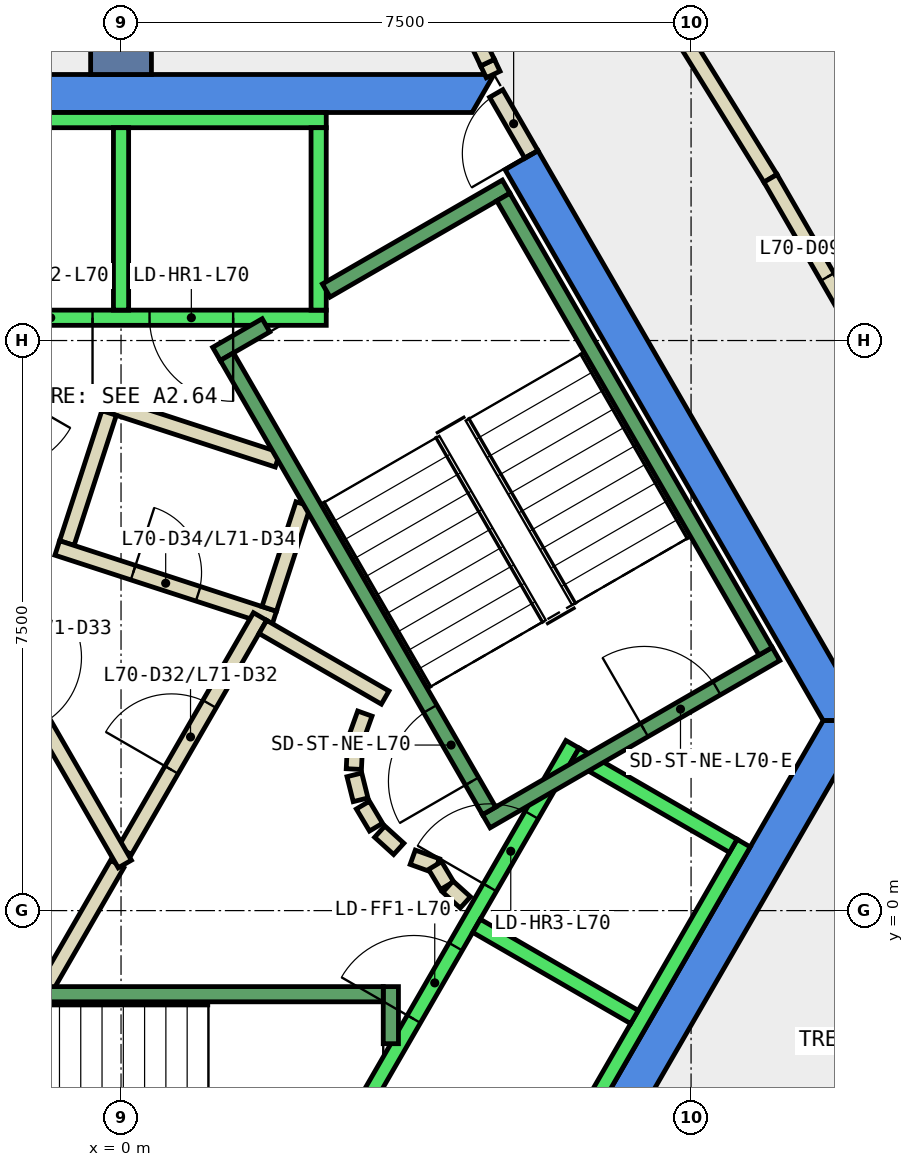
"""IFC4 building model, lengths in metres.
Left out: names, types, materials, properties, quantities, classifications, styles, units other than length and angle.
Written with IfcOpenShell. Run it as: python <this file> out.ifc"""

import sys

from ifc_helpers import new_model, si_unit, direction, frame, frame_2d, origin, place, context, subcontext, project, spatial, polyline, rectangle, outline, extrude, element, fill, save


model = new_model("IFC4")
c1 = context("Model", 3, precision=1e-05, world=origin(), true_north=direction((0.0, 1.0)))
c2 = subcontext(c1, "Body", "Model", "MODEL_VIEW")
j1 = project(units=[si_unit("LENGTHUNIT", "METRE"), si_unit("PLANEANGLEUNIT", "RADIAN")], contexts=[c1])
p1 = place(None, origin())
s1 = spatial("IfcSite", under=j1, at=p1, CompositionType="ELEMENT")
p2 = place(p1, origin())
s2 = spatial("IfcBuilding", under=s1, at=p2, CompositionType="ELEMENT")
p3 = place(p2, frame((0.0, 0.0, 300.8)))
s3 = spatial("IfcBuildingStorey", under=s2, at=p3, CompositionType="ELEMENT", Elevation=300.8)
p4 = place(p3, frame((0.0, 0.0, -0.34)))
e1 = element("IfcWall", 1, at=p4, inside=s3, PredefinedType="SHEAR", context=c2, shape_type="SweptSolid", body=[
    extrude(outline(polyline([(5.486, 9.998), (5.053, 9.748), (9.238, 2.5), (9.815, 2.5), (5.486, 9.998)])), origin(), (0.0, 0.0, 1.0), 3.6),
])
p5 = place(p3, frame((0.0, 0.0, -0.34)))
e2 = element("IfcWall", 2, at=p5, inside=s3, PredefinedType="SHEAR", context=c2, shape_type="SweptSolid", body=[
    extrude(outline(polyline([(4.907, 11.0), (-4.907, 11.0), (-4.619, 10.5), (4.619, 10.5), (4.907, 11.0)])), origin(), (0.0, 0.0, 1.0), 3.6),
])
p6 = place(p3, frame((0.0, 0.0, -0.34)))
e3 = element("IfcWall", 3, at=p6, inside=s3, PredefinedType="SHEAR", context=c2, shape_type="SweptSolid", body=[
    extrude(outline(polyline([(4.907, -6.0), (9.815, 2.5), (9.238, 2.5), (4.619, -5.5), (4.907, -6.0)])), origin(), (0.0, 0.0, 1.0), 3.6),
])
p7 = place(p3, frame((0.0, 11.0, -0.34), z_axis=(0.0, 0.0, 1.0), x_axis=(0.0, 1.0, 0.0)))
e4 = element("IfcWall", 4, at=p7, inside=s3, PredefinedType="SHEAR", context=c2, shape_type="SweptSolid", body=[
    extrude(rectangle(XDim=9.0, YDim=0.8, at=frame_2d((4.5, 0.0))), origin(), (0.0, 0.0, 1.0), 3.6),
])
p8 = place(p3, frame((2.06, 5.931, 0.0), z_axis=(0.0, 0.0, 1.0), x_axis=(-0.95092855133, 0.309410552932, 0.0)))
e5 = element("IfcWall", 5, at=p8, inside=s3, PredefinedType="PARTITIONING", context=c2, shape_type="SweptSolid", body=[
    extrude(rectangle(XDim=2.399, YDim=0.2, at=frame_2d((1.199, 0.0))), origin(), (0.0, 0.0, 1.0), 3.26),
])
p9 = place(p3, frame((-0.157, 6.547, 0.0), z_axis=(0.0, 0.0, 1.0), x_axis=(-0.308813127339, -0.951122732555, 0.0)))
e6 = element("IfcWall", 6, at=p9, inside=s3, PredefinedType="PARTITIONING", context=c2, shape_type="SweptSolid", body=[
    extrude(rectangle(XDim=1.8, YDim=0.2, at=frame_2d((0.9, 0.0))), origin(), (0.0, 0.0, 1.0), 3.26),
])
p10 = place(p3, frame((-0.839, 4.771, 0.0), z_axis=(0.0, 0.0, 1.0), x_axis=(0.950961084355, -0.309310549515, 0.0)))
e7 = element("IfcWall", 7, at=p10, inside=s3, PredefinedType="PARTITIONING", context=c2, shape_type="SweptSolid", body=[
    extrude(rectangle(XDim=3.0, YDim=0.2, at=frame_2d((1.5, 0.0))), origin(), (0.0, 0.0, 1.0), 3.26),
])
p11 = place(p10, frame((1.05, 0.0, 0.0)))
e8 = element("IfcOpeningElement", 8, at=p11, cuts=e7, PredefinedType="OPENING", context=c2, shape_type="SweptSolid", body=[
    extrude(rectangle(XDim=0.9, YDim=2.1, at=frame_2d((0.45, 1.05))), frame((0.0, 0.11, 0.0), z_axis=(0.0, -1.0, 0.0), x_axis=(1.0, 0.0, 0.0)), (0.0, 0.0, 1.0), 0.22),
])
p12 = place(p3, frame((1.95, 3.97, 0.0), z_axis=(0.0, 0.0, 1.0), x_axis=(0.308583003896, 0.951197418892, 0.0)))
e9 = element("IfcWall", 9, at=p12, inside=s3, PredefinedType="PARTITIONING", context=c2, shape_type="SweptSolid", body=[
    extrude(rectangle(XDim=1.449, YDim=0.2, at=frame_2d((0.724, 0.0))), origin(), (0.0, 0.0, 1.0), 3.26),
])
p13 = place(p3, frame((4.896, 11.0, 0.0), z_axis=(0.0, 0.0, 1.0), x_axis=(-0.428451014387, 0.903565010539, 0.0)))
e10 = element("IfcWall", 10, at=p13, inside=s3, PredefinedType="PARTITIONING", context=c2, shape_type="SweptSolid", body=[
    extrude(rectangle(XDim=0.173, YDim=0.2, at=frame_2d((0.086, 0.0))), origin(), (0.0, 0.0, 1.0), 2.4),
])
p14 = place(p3, frame((6.683, 12.642, 0.0), z_axis=(0.0, 0.0, 1.0), x_axis=(0.526290465295, -0.850304854825, 0.0)))
e11 = element("IfcWall", 11, at=p14, inside=s3, PredefinedType="PARTITIONING", context=c2, shape_type="SweptSolid", body=[
    extrude(rectangle(XDim=3.538, YDim=0.2, at=frame_2d((1.769, 0.0))), origin(), (0.0, 0.0, 1.0), 3.26),
])
p15 = place(p3, frame((8.545, 9.634, 0.0), z_axis=(0.0, 0.0, 1.0), x_axis=(0.50008212199, -0.86597798544, 0.0)))
e12 = element("IfcWall", 12, at=p15, inside=s3, PredefinedType="PARTITIONING", context=c2, shape_type="SweptSolid", body=[
    extrude(rectangle(XDim=3.995, YDim=0.2, at=frame_2d((1.998, 0.0))), origin(), (0.0, 0.0, 1.0), 3.26),
])
p16 = place(p15, frame((1.498, 0.0, 0.0)))
e13 = element("IfcOpeningElement", 13, at=p16, cuts=e12, PredefinedType="OPENING", context=c2, shape_type="SweptSolid", body=[
    extrude(rectangle(XDim=1.0, YDim=2.1, at=frame_2d((0.5, 1.05))), frame((0.0, 0.11, 0.0), z_axis=(0.0, -1.0, 0.0), x_axis=(1.0, 0.0, 0.0)), (0.0, 0.0, 1.0), 0.22),
])
p17 = place(p3, frame((-0.982, -1.0, 0.0), z_axis=(0.0, 0.0, 1.0), x_axis=(0.50024047865, 0.865886518847, 0.0)))
e14 = element("IfcWall", 14, at=p17, inside=s3, PredefinedType="PARTITIONING", context=c2, shape_type="SweptSolid", body=[
    extrude(rectangle(XDim=1.863, YDim=0.2, at=frame_2d((0.931, 0.0))), origin(), (0.0, 0.0, 1.0), 3.26),
])
p18 = place(p3, frame((0.05, 0.787, 0.0), z_axis=(0.0, 0.0, 1.0), x_axis=(0.499954076797, 0.866051915934, 0.0)))
e15 = element("IfcWall", 15, at=p18, inside=s3, PredefinedType="PARTITIONING", context=c2, shape_type="SweptSolid", body=[
    extrude(rectangle(XDim=3.558, YDim=0.2, at=frame_2d((1.779, 0.0))), origin(), (0.0, 0.0, 1.0), 3.26),
])
p19 = place(p18, frame((1.229, 0.0, 0.0)))
e16 = element("IfcOpeningElement", 16, at=p19, cuts=e15, PredefinedType="OPENING", context=c2, shape_type="SweptSolid", body=[
    extrude(rectangle(XDim=1.0, YDim=2.1, at=frame_2d((0.5, 1.05))), frame((0.0, 0.11, 0.0), z_axis=(0.0, -1.0, 0.0), x_axis=(1.0, 0.0, 0.0)), (0.0, 0.0, 1.0), 0.22),
])
p20 = place(p3, frame((1.866, 3.732, 0.0), z_axis=(0.0, 0.0, 1.0), x_axis=(0.866043361281, -0.499968895414, 0.0)))
e17 = element("IfcWall", 17, at=p20, inside=s3, PredefinedType="PARTITIONING", context=c2, shape_type="SweptSolid", body=[
    extrude(rectangle(XDim=1.858, YDim=0.2, at=frame_2d((0.929, 0.0))), origin(), (0.0, 0.0, 1.0), 3.26),
])
p21 = place(p3, frame((3.208, 2.592, 0.0), z_axis=(0.0, 0.0, 1.0), x_axis=(-0.337388820924, -0.941365382578, 0.0)))
e18 = element("IfcWall", 18, at=p21, inside=s3, PredefinedType="PARTITIONING", context=c2, shape_type="SweptSolid", body=[
    extrude(rectangle(XDim=0.338, YDim=0.2, at=frame_2d((0.169, 0.0))), origin(), (0.0, 0.0, 1.0), 3.26),
])
p22 = place(p3, frame((3.079, 2.199, 0.0), z_axis=(0.0, 0.0, 1.0), x_axis=(-0.047771483479, -0.998858290933, 0.0)))
e19 = element("IfcWall", 19, at=p22, inside=s3, PredefinedType="PARTITIONING", context=c2, shape_type="SweptSolid", body=[
    extrude(rectangle(XDim=0.337, YDim=0.2, at=frame_2d((0.169, 0.0))), origin(), (0.0, 0.0, 1.0), 3.26),
])
p23 = place(p3, frame((3.07, 1.786, 0.0), z_axis=(0.0, 0.0, 1.0), x_axis=(0.242705583207, -0.970099994784, 0.0)))
e20 = element("IfcWall", 20, at=p23, inside=s3, PredefinedType="PARTITIONING", context=c2, shape_type="SweptSolid", body=[
    extrude(rectangle(XDim=0.338, YDim=0.2, at=frame_2d((0.169, 0.0))), origin(), (0.0, 0.0, 1.0), 3.26),
])
for number, where, z_axis, x_axis in (
    (21, (3.182, 1.388, 0.0), (0.0, 0.0, 1.0), (0.512, -0.859, 0.0)),
    (22, (3.404, 1.039, 0.0), (0.0, 0.0, 1.0), (0.74, -0.672, 0.0)),
):
    element("IfcWall", number, at=place(p3, frame(where, z_axis=z_axis, x_axis=x_axis)), inside=s3, PredefinedType="PARTITIONING", context=c2, shape_type="SweptSolid", body=[
        extrude(rectangle(XDim=0.338, YDim=0.2, at=frame_2d((0.169, 0.0))), origin(), (0.0, 0.0, 1.0), 3.26),
    ])
p24 = place(p3, frame((3.838, 0.702, 0.0), z_axis=(0.0, 0.0, 1.0), x_axis=(0.941035081519, -0.338308993895, 0.0)))
e23 = element("IfcWall", 23, at=p24, inside=s3, PredefinedType="PARTITIONING", context=c2, shape_type="SweptSolid", body=[
    extrude(rectangle(XDim=0.337, YDim=0.2, at=frame_2d((0.168, 0.0))), origin(), (0.0, 0.0, 1.0), 3.26),
])
p25 = place(p3, frame((4.132, 0.593, 0.0), z_axis=(0.0, 0.0, 1.0), x_axis=(0.513561617048, -0.858052717201, 0.0)))
e24 = element("IfcWall", 24, at=p25, inside=s3, PredefinedType="PARTITIONING", context=c2, shape_type="SweptSolid", body=[
    extrude(rectangle(XDim=0.308, YDim=0.2, at=frame_2d((0.154, 0.0))), origin(), (0.0, 0.0, 1.0), 3.26),
])
p26 = place(p3, frame((4.301, 0.315, 0.0), z_axis=(0.0, 0.0, 1.0), x_axis=(0.741798017506, -0.670623367639, 0.0)))
e25 = element("IfcWall", 25, at=p26, inside=s3, PredefinedType="PARTITIONING", context=c2, shape_type="SweptSolid", body=[
    extrude(rectangle(XDim=0.309, YDim=0.2, at=frame_2d((0.154, 0.0))), origin(), (0.0, 0.0, 1.0), 3.26),
])
p27 = place(p3, frame((-2.54, 5.1, 0.0), z_axis=(0.0, 0.0, 1.0), x_axis=(0.499925051871, -0.866068670783, 0.0)))
e26 = element("IfcWall", 26, at=p27, inside=s3, PredefinedType="PARTITIONING", context=c2, shape_type="SweptSolid", body=[
    extrude(rectangle(XDim=5.181, YDim=0.2, at=frame_2d((2.59, 0.0))), origin(), (0.0, 0.0, 1.0), 3.26),
])
p28 = place(p27, frame((2.04, 0.0, 0.0)))
e27 = element("IfcOpeningElement", 27, at=p28, cuts=e26, PredefinedType="OPENING", context=c2, shape_type="SweptSolid", body=[
    extrude(rectangle(XDim=1.0, YDim=2.1, at=frame_2d((0.5, 1.05))), frame((0.0, 0.11, 0.0), z_axis=(0.0, -1.0, 0.0), x_axis=(1.0, 0.0, 0.0)), (0.0, 0.0, 1.0), 0.22),
])
p29 = place(p3, frame((5.399, 9.948, 0.0), z_axis=(0.0, 0.0, 1.0), x_axis=(-0.499882215713, 0.866093395895, 0.0)))
e28 = element("IfcWall", 28, at=p29, inside=s3, PredefinedType="PARTITIONING", context=c2, shape_type="SweptSolid", body=[
    extrude(rectangle(XDim=0.926, YDim=0.2, at=frame_2d((0.463, 0.0))), origin(), (0.0, 0.0, 1.0), 2.4),
])
p30 = place(p29, frame((0.017, 0.0, 0.0)))
e29 = element("IfcOpeningElement", 29, at=p30, cuts=e28, PredefinedType="OPENING", context=c2, shape_type="SweptSolid", body=[
    extrude(rectangle(XDim=0.9, YDim=2.1, at=frame_2d((0.45, 1.05))), frame((0.0, 0.11, 0.0), z_axis=(0.0, -1.0, 0.0), x_axis=(1.0, 0.0, 0.0)), (0.0, 0.0, 1.0), 0.22),
])
p31 = place(p3, frame((4.822, 11.156, 0.0), z_axis=(0.0, 0.0, 1.0), x_axis=(-0.429057973289, 0.903276953961, 0.0)))
e30 = element("IfcWall", 30, at=p31, inside=s3, PredefinedType="PARTITIONING", context=c2, shape_type="SweptSolid", body=[
    extrude(rectangle(XDim=4.298, YDim=0.2, at=frame_2d((2.149, 0.0))), origin(), (0.0, 0.0, 1.0), 3.26),
])
p32 = place(p3, frame((2.7, 7.8, 0.0), z_axis=(0.0, 0.0, 1.0), x_axis=(-1.0, 0.0, 0.0)))
e31 = element("IfcWall", 31, at=p32, inside=s3, PredefinedType="STANDARD", context=c2, shape_type="SweptSolid", body=[
    extrude(rectangle(XDim=5.4, YDim=0.2, at=frame_2d((2.7, 0.0))), origin(), (0.0, 0.0, 1.0), 3.26),
])
p33 = place(p32, frame((1.225, 0.0, 0.0)))
e32 = element("IfcOpeningElement", 32, at=p33, cuts=e31, PredefinedType="OPENING", context=c2, shape_type="SweptSolid", body=[
    extrude(rectangle(XDim=1.1, YDim=2.1, at=frame_2d((0.55, 1.05))), frame((0.0, 0.11, 0.0), z_axis=(0.0, -1.0, 0.0), x_axis=(1.0, 0.0, 0.0)), (0.0, 0.0, 1.0), 0.22),
])
p34 = place(p32, frame((3.075, 0.0, 0.0)))
e33 = element("IfcOpeningElement", 33, at=p34, cuts=e31, PredefinedType="OPENING", context=c2, shape_type="SweptSolid", body=[
    extrude(rectangle(XDim=1.1, YDim=2.1, at=frame_2d((0.55, 1.05))), frame((0.0, 0.11, 0.0), z_axis=(0.0, -1.0, 0.0), x_axis=(1.0, 0.0, 0.0)), (0.0, 0.0, 1.0), 0.22),
])
p35 = place(p3, frame((2.7, 10.4, 0.0), z_axis=(0.0, 0.0, 1.0), x_axis=(-1.0, 0.0, 0.0)))
e34 = element("IfcWall", 34, at=p35, inside=s3, PredefinedType="STANDARD", context=c2, shape_type="SweptSolid", body=[
    extrude(rectangle(XDim=5.4, YDim=0.2, at=frame_2d((2.7, 0.0))), origin(), (0.0, 0.0, 1.0), 3.26),
])
for number, where, z_axis, x_axis in (
    (35, (2.6, 7.9, 0.0), (0.0, 0.0, 1.0), (0.0, 1.0, 0.0)),
    (36, (0.0, 7.9, 0.0), (0.0, 0.0, 1.0), (0.0, 1.0, 0.0)),
):
    element("IfcWall", number, at=place(p3, frame(where, z_axis=z_axis, x_axis=x_axis)), inside=s3, PredefinedType="STANDARD", context=c2, shape_type="SweptSolid", body=[
        extrude(rectangle(XDim=2.4, YDim=0.2, at=frame_2d((1.2, 0.0))), origin(), (0.0, 0.0, 1.0), 3.26),
    ])
p36 = place(p3, frame((3.24, -2.488, 0.0), z_axis=(0.0, 0.0, 1.0), x_axis=(0.500034260056, 0.866005622828, 0.0)))
e37 = element("IfcWall", 37, at=p36, inside=s3, PredefinedType="STANDARD", context=c2, shape_type="SweptSolid", body=[
    extrude(rectangle(XDim=5.399, YDim=0.2, at=frame_2d((2.7, 0.0))), origin(), (0.0, 0.0, 1.0), 3.26),
])
p37 = place(p36, frame((3.225, 0.0, 0.0)))
e38 = element("IfcOpeningElement", 38, at=p37, cuts=e37, PredefinedType="OPENING", context=c2, shape_type="SweptSolid", body=[
    extrude(rectangle(XDim=1.1, YDim=2.1, at=frame_2d((0.55, 1.05))), frame((0.0, 0.11, 0.0), z_axis=(0.0, -1.0, 0.0), x_axis=(1.0, 0.0, 0.0)), (0.0, 0.0, 1.0), 0.22),
])
p38 = place(p36, frame((1.225, 0.0, 0.0)))
e39 = element("IfcOpeningElement", 39, at=p38, cuts=e37, PredefinedType="OPENING", context=c2, shape_type="SweptSolid", body=[
    extrude(rectangle(XDim=1.1, YDim=2.1, at=frame_2d((0.55, 1.05))), frame((0.0, 0.11, 0.0), z_axis=(0.0, -1.0, 0.0), x_axis=(1.0, 0.0, 0.0)), (0.0, 0.0, 1.0), 0.22),
])
p39 = place(p3, frame((5.492, -3.788, 0.0), z_axis=(0.0, 0.0, 1.0), x_axis=(0.500034260056, 0.866005622828, 0.0)))
e40 = element("IfcWall", 40, at=p39, inside=s3, PredefinedType="STANDARD", context=c2, shape_type="SweptSolid", body=[
    extrude(rectangle(XDim=5.399, YDim=0.2, at=frame_2d((2.7, 0.0))), origin(), (0.0, 0.0, 1.0), 3.26),
])
for number, where, z_axis, x_axis in (
    (41, (4.677, -0.2, 0.0), (0.0, 0.0, 1.0), (0.866, -0.5, 0.0)),
    (42, (5.977, 2.052, 0.0), (0.0, 0.0, 1.0), (0.866, -0.5, 0.0)),
):
    element("IfcWall", number, at=place(p3, frame(where, z_axis=z_axis, x_axis=x_axis)), inside=s3, PredefinedType="STANDARD", context=c2, shape_type="SweptSolid", body=[
        extrude(rectangle(XDim=2.399, YDim=0.2, at=frame_2d((1.2, 0.0))), origin(), (0.0, 0.0, 1.0), 3.26),
    ])
p40 = place(p3, frame((3.55, -1.0, 0.0), z_axis=(0.0, 0.0, 1.0), x_axis=(0.0, -1.0, 0.0)))
e43 = element("IfcWall", 43, at=p40, inside=s3, PredefinedType="STANDARD", context=c2, shape_type="SweptSolid", body=[
    extrude(rectangle(XDim=0.751, YDim=0.2, at=frame_2d((0.375, 0.0))), origin(), (0.0, 0.0, 1.0), 3.26),
])
p41 = place(p3, frame((-3.45, -1.1, 0.0), z_axis=(0.0, 0.0, 1.0), x_axis=(1.0, 0.0, 0.0)))
e44 = element("IfcWall", 44, at=p41, inside=s3, PredefinedType="STANDARD", context=c2, shape_type="SweptSolid", body=[
    extrude(rectangle(XDim=6.9, YDim=0.2, at=frame_2d((3.45, 0.0))), origin(), (0.0, 0.0, 1.0), 3.26),
])
p42 = place(p41, frame((0.45, 0.0, 0.0)))
e45 = element("IfcOpeningElement", 45, at=p42, cuts=e44, PredefinedType="OPENING", context=c2, shape_type="SweptSolid", body=[
    extrude(rectangle(XDim=1.1, YDim=2.2, at=frame_2d((0.55, 1.1))), frame((0.0, 0.11, 0.0), z_axis=(0.0, -1.0, 0.0), x_axis=(1.0, 0.0, 0.0)), (0.0, 0.0, 1.0), 0.22),
])
p43 = place(p3, frame((4.806, 1.176, 0.0), z_axis=(0.0, 0.0, 1.0), x_axis=(0.866059941101, 0.499940174841, 0.0)))
e46 = element("IfcWall", 46, at=p43, inside=s3, PredefinedType="STANDARD", context=c2, shape_type="SweptSolid", body=[
    extrude(rectangle(XDim=4.4, YDim=0.2, at=frame_2d((2.2, 0.0))), origin(), (0.0, 0.0, 1.0), 3.26),
])
p44 = place(p43, frame((2.4, 0.0, 0.0)))
e47 = element("IfcOpeningElement", 47, at=p44, cuts=e46, PredefinedType="OPENING", context=c2, shape_type="SweptSolid", body=[
    extrude(rectangle(XDim=1.1, YDim=2.2, at=frame_2d((0.55, 1.1))), frame((0.0, 0.11, 0.0), z_axis=(0.0, -1.0, 0.0), x_axis=(1.0, 0.0, 0.0)), (0.0, 0.0, 1.0), 0.22),
])
p45 = place(p3, frame((2.7, 8.158, 0.0), z_axis=(0.0, 0.0, 1.0), x_axis=(0.86611865017, 0.499838457731, 0.0)))
e48 = element("IfcWall", 48, at=p45, inside=s3, PredefinedType="STANDARD", context=c2, shape_type="SweptSolid", body=[
    extrude(rectangle(XDim=2.733, YDim=0.2, at=frame_2d((1.366, 0.0))), origin(), (0.0, 0.0, 1.0), 3.26),
])
p46 = place(p3, frame((1.256, 7.324, 0.0), z_axis=(0.0, 0.0, 1.0), x_axis=(0.865915093549, 0.500191014278, 0.0)))
e49 = element("IfcWall", 49, at=p46, inside=s3, PredefinedType="STANDARD", context=c2, shape_type="SweptSolid", body=[
    extrude(rectangle(XDim=0.752, YDim=0.2, at=frame_2d((0.376, 0.0))), origin(), (0.0, 0.0, 1.0), 3.26),
])
p47 = place(p3, frame((4.843, 1.312, 0.0), z_axis=(0.0, 0.0, 1.0), x_axis=(-0.499963383562, 0.866046543262, 0.0)))
e50 = element("IfcWall", 50, at=p47, inside=s3, PredefinedType="STANDARD", context=c2, shape_type="SweptSolid", body=[
    extrude(rectangle(XDim=6.9, YDim=0.2, at=frame_2d((3.45, 0.0))), origin(), (0.0, 0.0, 1.0), 3.26),
])
p48 = place(p47, frame((0.45, 0.0, 0.0)))
e51 = element("IfcOpeningElement", 51, at=p48, cuts=e50, PredefinedType="OPENING", context=c2, shape_type="SweptSolid", body=[
    extrude(rectangle(XDim=1.1, YDim=2.2, at=frame_2d((0.55, 1.1))), frame((0.0, 0.11, 0.0), z_axis=(0.0, -1.0, 0.0), x_axis=(1.0, 0.0, 0.0)), (0.0, 0.0, 1.0), 0.22),
])
p49 = place(p3, frame((8.48, 3.412, 0.0), z_axis=(0.0, 0.0, 1.0), x_axis=(-0.499978703459, 0.866037698999, 0.0)))
e52 = element("IfcWall", 52, at=p49, inside=s3, PredefinedType="STANDARD", context=c2, shape_type="SweptSolid", body=[
    extrude(rectangle(XDim=6.9, YDim=0.2, at=frame_2d((3.45, 0.0))), origin(), (0.0, 0.0, 1.0), 3.26),
])
p50 = place(p16, origin())
e53 = element("IfcDoor", 53, at=p50, inside=s3, OperationType="SINGLE_SWING_LEFT", PredefinedType="DOOR", context=c2, shape_type="SweptSolid", body=[
    extrude(rectangle(XDim=1.0, YDim=2.1, at=frame_2d((0.5, 1.05))), frame((0.0, 0.025, 0.0), z_axis=(0.0, -1.0, 0.0), x_axis=(1.0, 0.0, 0.0)), (0.0, 0.0, 1.0), 0.05),
])
fill(e13, e53)
p51 = place(p19, origin())
e54 = element("IfcDoor", 54, at=p51, inside=s3, OperationType="SINGLE_SWING_RIGHT", PredefinedType="DOOR", context=c2, shape_type="SweptSolid", body=[
    extrude(rectangle(XDim=1.0, YDim=2.1, at=frame_2d((0.5, 1.05))), frame((0.0, 0.025, 0.0), z_axis=(0.0, -1.0, 0.0), x_axis=(1.0, 0.0, 0.0)), (0.0, 0.0, 1.0), 0.05),
])
fill(e16, e54)
p52 = place(p11, origin())
e55 = element("IfcDoor", 55, at=p52, inside=s3, OperationType="SINGLE_SWING_LEFT", PredefinedType="DOOR", context=c2, shape_type="SweptSolid", body=[
    extrude(rectangle(XDim=0.9, YDim=2.1, at=frame_2d((0.45, 1.05))), frame((0.0, 0.025, 0.0), z_axis=(0.0, -1.0, 0.0), x_axis=(1.0, 0.0, 0.0)), (0.0, 0.0, 1.0), 0.05),
])
fill(e8, e55)
p53 = place(p30, origin())
e56 = element("IfcDoor", 56, at=p53, inside=s3, OperationType="SINGLE_SWING_LEFT", PredefinedType="DOOR", context=c2, shape_type="SweptSolid", body=[
    extrude(rectangle(XDim=0.9, YDim=2.1, at=frame_2d((0.45, 1.05))), frame((0.0, 0.025, 0.0), z_axis=(0.0, -1.0, 0.0), x_axis=(1.0, 0.0, 0.0)), (0.0, 0.0, 1.0), 0.05),
])
fill(e29, e56)
p54 = place(p33, origin())
e57 = element("IfcDoor", 57, at=p54, inside=s3, OperationType="SLIDING_TO_LEFT", PredefinedType="DOOR", context=c2, shape_type="SweptSolid", body=[
    extrude(rectangle(XDim=1.1, YDim=2.1, at=frame_2d((0.55, 1.05))), frame((0.0, 0.025, 0.0), z_axis=(0.0, -1.0, 0.0), x_axis=(1.0, 0.0, 0.0)), (0.0, 0.0, 1.0), 0.05),
])
fill(e32, e57)
p55 = place(p34, origin())
e58 = element("IfcDoor", 58, at=p55, inside=s3, OperationType="SLIDING_TO_LEFT", PredefinedType="DOOR", context=c2, shape_type="SweptSolid", body=[
    extrude(rectangle(XDim=1.1, YDim=2.1, at=frame_2d((0.55, 1.05))), frame((0.0, 0.025, 0.0), z_axis=(0.0, -1.0, 0.0), x_axis=(1.0, 0.0, 0.0)), (0.0, 0.0, 1.0), 0.05),
])
fill(e33, e58)
p56 = place(p37, origin())
e59 = element("IfcDoor", 59, at=p56, inside=s3, OperationType="SLIDING_TO_LEFT", PredefinedType="DOOR", context=c2, shape_type="SweptSolid", body=[
    extrude(rectangle(XDim=1.1, YDim=2.1, at=frame_2d((0.55, 1.05))), frame((0.0, 0.025, 0.0), z_axis=(0.0, -1.0, 0.0), x_axis=(1.0, 0.0, 0.0)), (0.0, 0.0, 1.0), 0.05),
])
fill(e38, e59)
p57 = place(p38, origin())
e60 = element("IfcDoor", 60, at=p57, inside=s3, OperationType="SLIDING_TO_LEFT", PredefinedType="DOOR", context=c2, shape_type="SweptSolid", body=[
    extrude(rectangle(XDim=1.1, YDim=2.1, at=frame_2d((0.55, 1.05))), frame((0.0, 0.025, 0.0), z_axis=(0.0, -1.0, 0.0), x_axis=(1.0, 0.0, 0.0)), (0.0, 0.0, 1.0), 0.05),
])
fill(e39, e60)
p58 = place(p48, origin())
e61 = element("IfcDoor", 61, at=p58, inside=s3, OperationType="SINGLE_SWING_LEFT", PredefinedType="DOOR", context=c2, shape_type="SweptSolid", body=[
    extrude(rectangle(XDim=1.1, YDim=2.2, at=frame_2d((0.55, 1.1))), frame((0.0, 0.025, 0.0), z_axis=(0.0, -1.0, 0.0), x_axis=(1.0, 0.0, 0.0)), (0.0, 0.0, 1.0), 0.05),
])
fill(e51, e61)
p59 = place(p44, origin())
e62 = element("IfcDoor", 62, at=p59, inside=s3, OperationType="SINGLE_SWING_LEFT", PredefinedType="DOOR", context=c2, shape_type="SweptSolid", body=[
    extrude(rectangle(XDim=1.1, YDim=2.2, at=frame_2d((0.55, 1.1))), frame((0.0, 0.025, 0.0), z_axis=(0.0, -1.0, 0.0), x_axis=(1.0, 0.0, 0.0)), (0.0, 0.0, 1.0), 0.05),
])
fill(e47, e62)
save(model, sys.argv[1])
